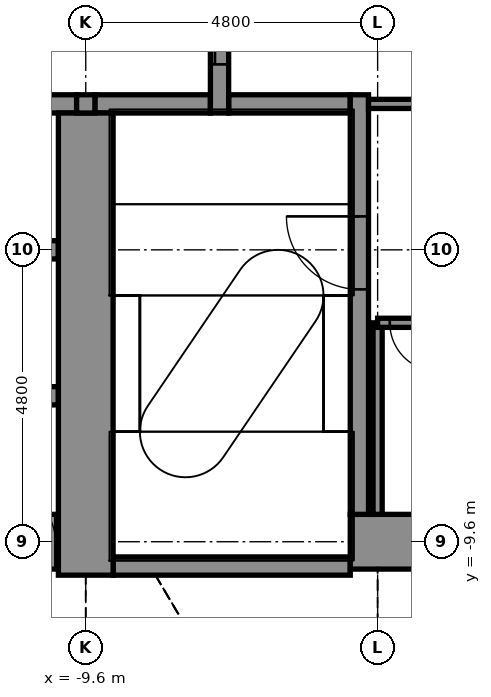
"""IFC4 building model, lengths in metres.
Left out: names, types, materials, properties, quantities, classifications, styles, units other than length and angle.
Written with IfcOpenShell. Run it as: python <this file> out.ifc"""

import sys

from ifc_helpers import new_model, si_unit, direction, frame, frame_2d, origin, place, context, subcontext, project, spatial, rectangle, extrude, element, fill, save


model = new_model("IFC4")
c1 = context("Model", 3, precision=1e-05, world=origin(), true_north=direction((0.0, 1.0)))
c2 = subcontext(c1, "Body", "Model", "MODEL_VIEW")
j1 = project(units=[si_unit("LENGTHUNIT", "METRE"), si_unit("PLANEANGLEUNIT", "RADIAN")], contexts=[c1])
p1 = place(None, origin())
s1 = spatial("IfcSite", under=j1, at=p1, CompositionType="ELEMENT")
p2 = place(p1, origin())
s2 = spatial("IfcBuilding", under=s1, at=p2, CompositionType="ELEMENT")
p3 = place(p2, frame((0.0, 0.0, 127.4)))
s3 = spatial("IfcBuildingStorey", under=s2, at=p3, CompositionType="ELEMENT", Elevation=127.4)
p4 = place(p3, frame((-9.15, -10.0, -0.3), z_axis=(0.0, 0.0, 1.0), x_axis=(1.0, 0.0, 0.0)))
e1 = element("IfcWall", 1, at=p4, inside=s3, PredefinedType="STANDARD", context=c2, shape_type="SweptSolid", body=[
    extrude(rectangle(XDim=3.9, YDim=0.3, at=frame_2d((1.95, 0.0))), origin(), (0.0, 0.0, 1.0), 6.15),
])
p5 = place(p3, frame((-13.95, -9.6, -0.3), z_axis=(0.0, 0.0, 1.0), x_axis=(1.0, 0.0, 0.0)))
e2 = element("IfcWall", 2, at=p5, inside=s3, PredefinedType="SHEAR", context=c2, shape_type="SweptSolid", body=[
    extrude(rectangle(XDim=3.9, YDim=0.9, at=frame_2d((1.95, 0.0))), origin(), (0.0, 0.0, 1.0), 6.15),
])
p6 = place(p5, frame((0.05, 0.0, 0.3)))
e3 = element("IfcOpeningElement", 3, at=p6, cuts=e2, PredefinedType="OPENING", context=c2, shape_type="SweptSolid", body=[
    extrude(rectangle(XDim=0.9, YDim=2.1, at=frame_2d((0.45, 1.05))), frame((0.0, 0.46, 0.0), z_axis=(0.0, -1.0, 0.0), x_axis=(1.0, 0.0, 0.0)), (0.0, 0.0, 1.0), 0.92),
])
p7 = place(p5, frame((1.5, 0.0, 0.3)))
e4 = element("IfcOpeningElement", 4, at=p7, cuts=e2, PredefinedType="OPENING", context=c2, shape_type="SweptSolid", body=[
    extrude(rectangle(XDim=0.9, YDim=2.1, at=frame_2d((0.45, 1.05))), frame((0.0, 0.46, 0.0), z_axis=(0.0, -1.0, 0.0), x_axis=(1.0, 0.0, 0.0)), (0.0, 0.0, 1.0), 0.92),
])
p8 = place(p5, frame((2.95, 0.0, 0.3)))
e5 = element("IfcOpeningElement", 5, at=p8, cuts=e2, PredefinedType="OPENING", context=c2, shape_type="SweptSolid", body=[
    extrude(rectangle(XDim=0.9, YDim=2.1, at=frame_2d((0.45, 1.05))), frame((0.0, 0.46, 0.0), z_axis=(0.0, -1.0, 0.0), x_axis=(1.0, 0.0, 0.0)), (0.0, 0.0, 1.0), 0.92),
])
p9 = place(p3, frame((-5.25, -9.6, -0.3), z_axis=(0.0, 0.0, 1.0), x_axis=(1.0, 0.0, 0.0)))
e6 = element("IfcWall", 6, at=p9, inside=s3, PredefinedType="SHEAR", context=c2, shape_type="SweptSolid", body=[
    extrude(rectangle(XDim=10.2, YDim=0.9, at=frame_2d((5.1, 0.0))), origin(), (0.0, 0.0, 1.0), 6.15),
])
p10 = place(p9, frame((9.0, 0.0, 0.3)))
e7 = element("IfcOpeningElement", 7, at=p10, cuts=e6, PredefinedType="OPENING", context=c2, shape_type="SweptSolid", body=[
    extrude(rectangle(XDim=0.9, YDim=2.1, at=frame_2d((0.45, 1.05))), frame((0.0, 0.46, 0.0), z_axis=(0.0, -1.0, 0.0), x_axis=(1.0, 0.0, 0.0)), (0.0, 0.0, 1.0), 0.92),
])
p11 = place(p3, frame((-13.95, -7.2, -0.3), z_axis=(0.0, 0.0, 1.0), x_axis=(1.0, 0.0, 0.0)))
e8 = element("IfcWall", 8, at=p11, inside=s3, PredefinedType="STANDARD", context=c2, shape_type="SweptSolid", body=[
    extrude(rectangle(XDim=3.9, YDim=0.3, at=frame_2d((1.95, 0.0))), origin(), (0.0, 0.0, 1.0), 6.15),
])
p12 = place(p3, frame((-13.95, -4.8, -0.3), z_axis=(0.0, 0.0, 1.0), x_axis=(1.0, 0.0, 0.0)))
e9 = element("IfcWall", 9, at=p12, inside=s3, PredefinedType="STANDARD", context=c2, shape_type="SweptSolid", body=[
    extrude(rectangle(XDim=3.9, YDim=0.3, at=frame_2d((1.95, 0.0))), origin(), (0.0, 0.0, 1.0), 4.7),
])
p13 = place(p3, frame((-10.85, -2.4, -0.3), z_axis=(0.0, 0.0, 1.0), x_axis=(1.0, 0.0, 0.0)))
e10 = element("IfcWall", 10, at=p13, inside=s3, PredefinedType="STANDARD", context=c2, shape_type="SweptSolid", body=[
    extrude(rectangle(XDim=1.1, YDim=0.3, at=frame_2d((0.55, 0.0))), origin(), (0.0, 0.0, 1.0), 6.15),
])
p14 = place(p3, frame((-9.45, -2.4, -0.3), z_axis=(0.0, 0.0, 1.0), x_axis=(1.0, 0.0, 0.0)))
e11 = element("IfcWall", 11, at=p14, inside=s3, PredefinedType="STANDARD", context=c2, shape_type="SweptSolid", body=[
    extrude(rectangle(XDim=1.9, YDim=0.3, at=frame_2d((0.95, 0.0))), origin(), (0.0, 0.0, 1.0), 6.15),
])
p15 = place(p3, frame((-7.25, -2.4, -0.3), z_axis=(0.0, 0.0, 1.0), x_axis=(1.0, 0.0, 0.0)))
e12 = element("IfcWall", 12, at=p15, inside=s3, PredefinedType="STANDARD", context=c2, shape_type="SweptSolid", body=[
    extrude(rectangle(XDim=2.0, YDim=0.3, at=frame_2d((1.0, 0.0))), origin(), (0.0, 0.0, 1.0), 6.15),
])
p16 = place(p3, frame((-9.6, -10.15, -0.3), z_axis=(0.0, 0.0, 1.0), x_axis=(0.0, 1.0, 0.0)))
e13 = element("IfcWall", 13, at=p16, inside=s3, PredefinedType="SHEAR", context=c2, shape_type="SweptSolid", body=[
    extrude(rectangle(XDim=7.6, YDim=0.9, at=frame_2d((3.8, 0.0))), origin(), (0.0, 0.0, 1.0), 6.15),
])
p17 = place(p3, frame((-9.6, -2.55, -0.3), z_axis=(0.0, 0.0, 1.0), x_axis=(0.0, 1.0, 0.0)))
e14 = element("IfcWall", 14, at=p17, inside=s3, PredefinedType="STANDARD", context=c2, shape_type="SweptSolid", body=[
    extrude(rectangle(XDim=0.3, YDim=0.3, at=frame_2d((0.15, 0.0))), origin(), (0.0, 0.0, 1.0), 6.15),
])
p18 = place(p3, frame((-7.4, -2.55, -0.3), z_axis=(0.0, 0.0, 1.0), x_axis=(0.0, 1.0, 0.0)))
e15 = element("IfcWall", 15, at=p18, inside=s3, PredefinedType="STANDARD", context=c2, shape_type="SweptSolid", body=[
    extrude(rectangle(XDim=5.1, YDim=0.3, at=frame_2d((2.55, 0.0))), origin(), (0.0, 0.0, 1.0), 6.15),
])
p19 = place(p18, frame((0.8, 0.0, 0.3)))
e16 = element("IfcOpeningElement", 16, at=p19, cuts=e15, PredefinedType="OPENING", context=c2, shape_type="SweptSolid", body=[
    extrude(rectangle(XDim=1.1, YDim=2.1, at=frame_2d((0.55, 1.05))), frame((0.0, 0.16, 0.0), z_axis=(0.0, -1.0, 0.0), x_axis=(1.0, 0.0, 0.0)), (0.0, 0.0, 1.0), 0.32),
])
p20 = place(p18, frame((3.2, 0.0, 0.3)))
e17 = element("IfcOpeningElement", 17, at=p20, cuts=e15, PredefinedType="OPENING", context=c2, shape_type="SweptSolid", body=[
    extrude(rectangle(XDim=1.1, YDim=2.1, at=frame_2d((0.55, 1.05))), frame((0.0, 0.16, 0.0), z_axis=(0.0, -1.0, 0.0), x_axis=(1.0, 0.0, 0.0)), (0.0, 0.0, 1.0), 0.32),
])
p21 = place(p3, frame((-5.1, -9.15, -0.3), z_axis=(0.0, 0.0, 1.0), x_axis=(0.0, 1.0, 0.0)))
e18 = element("IfcWall", 18, at=p21, inside=s3, PredefinedType="STANDARD", context=c2, shape_type="SweptSolid", body=[
    extrude(rectangle(XDim=6.9, YDim=0.3, at=frame_2d((3.45, 0.0))), origin(), (0.0, 0.0, 1.0), 6.15),
])
p22 = place(p21, frame((3.7, 0.0, 0.3)))
e19 = element("IfcOpeningElement", 19, at=p22, cuts=e18, PredefinedType="OPENING", context=c2, shape_type="SweptSolid", body=[
    extrude(rectangle(XDim=1.2, YDim=2.1, at=frame_2d((0.6, 1.05))), frame((0.0, 0.16, 0.0), z_axis=(0.0, -1.0, 0.0), x_axis=(1.0, 0.0, 0.0)), (0.0, 0.0, 1.0), 0.32),
])
p23 = place(p3, frame((-4.8, -9.15, 0.0), z_axis=(0.0, 0.0, 1.0), x_axis=(0.0, 1.0, 0.0)))
e20 = element("IfcWall", 20, at=p23, inside=s3, PredefinedType="PARTITIONING", context=c2, shape_type="SweptSolid", body=[
    extrude(rectangle(XDim=3.15, YDim=0.15, at=frame_2d((1.575, 0.0))), origin(), (0.0, 0.0, 1.0), 5.85),
])
p24 = place(p3, frame((-4.8, -6.0, 0.0), z_axis=(0.0, 0.0, 1.0), x_axis=(1.0, 0.0, 0.0)))
e21 = element("IfcWall", 21, at=p24, inside=s3, PredefinedType="PARTITIONING", context=c2, shape_type="SweptSolid", body=[
    extrude(rectangle(XDim=1.05, YDim=0.15, at=frame_2d((0.525, 0.0))), origin(), (0.0, 0.0, 1.0), 5.85),
])
p25 = place(p24, frame((0.2, 0.0, 0.0)))
e22 = element("IfcOpeningElement", 22, at=p25, cuts=e21, PredefinedType="OPENING", context=c2, shape_type="SweptSolid", body=[
    extrude(rectangle(XDim=0.8, YDim=2.1, at=frame_2d((0.4, 1.05))), frame((0.0, 0.085, 0.0), z_axis=(0.0, -1.0, 0.0), x_axis=(1.0, 0.0, 0.0)), (0.0, 0.0, 1.0), 0.17),
])
p26 = place(p3, frame((-4.95, -2.4, 0.0), z_axis=(0.0, 0.0, 1.0), x_axis=(1.0, 0.0, 0.0)))
e23 = element("IfcWall", 23, at=p26, inside=s3, PredefinedType="PARTITIONING", context=c2, shape_type="SweptSolid", body=[
    extrude(rectangle(XDim=1.2, YDim=0.15, at=frame_2d((0.6, 0.0))), origin(), (0.0, 0.0, 1.0), 5.85),
])
p27 = place(p25, frame((0.8, 0.0, 0.0), z_axis=(0.0, 0.0, 1.0), x_axis=(-1.0, 0.0, 0.0)))
e24 = element("IfcDoor", 24, at=p27, inside=s3, OperationType="SINGLE_SWING_RIGHT", PredefinedType="DOOR", context=c2, shape_type="SweptSolid", body=[
    extrude(rectangle(XDim=0.8, YDim=2.1, at=frame_2d((0.4, 1.05))), frame((0.0, 0.025, 0.0), z_axis=(0.0, -1.0, 0.0), x_axis=(1.0, 0.0, 0.0)), (0.0, 0.0, 1.0), 0.05),
])
fill(e22, e24)
p28 = place(p19, origin())
e25 = element("IfcDoor", 25, at=p28, inside=s3, OperationType="DOUBLE_DOOR_SLIDING", PredefinedType="DOOR", context=c2, shape_type="SweptSolid", body=[
    extrude(rectangle(XDim=1.1, YDim=2.1, at=frame_2d((0.55, 1.05))), frame((0.0, 0.025, 0.0), z_axis=(0.0, -1.0, 0.0), x_axis=(1.0, 0.0, 0.0)), (0.0, 0.0, 1.0), 0.05),
])
fill(e16, e25)
p29 = place(p22, origin())
e26 = element("IfcDoor", 26, at=p29, inside=s3, OperationType="SINGLE_SWING_RIGHT", PredefinedType="DOOR", context=c2, shape_type="SweptSolid", body=[
    extrude(rectangle(XDim=1.2, YDim=2.1, at=frame_2d((0.6, 1.05))), frame((0.0, 0.025, 0.0), z_axis=(0.0, -1.0, 0.0), x_axis=(1.0, 0.0, 0.0)), (0.0, 0.0, 1.0), 0.05),
])
fill(e19, e26)
p30 = place(p8, origin())
e27 = element("IfcDoor", 27, at=p30, inside=s3, OperationType="SINGLE_SWING_LEFT", PredefinedType="DOOR", context=c2, shape_type="SweptSolid", body=[
    extrude(rectangle(XDim=0.9, YDim=2.1, at=frame_2d((0.45, 1.05))), frame((0.0, 0.025, 0.0), z_axis=(0.0, -1.0, 0.0), x_axis=(1.0, 0.0, 0.0)), (0.0, 0.0, 1.0), 0.05),
])
fill(e5, e27)
save(model, sys.argv[1])
